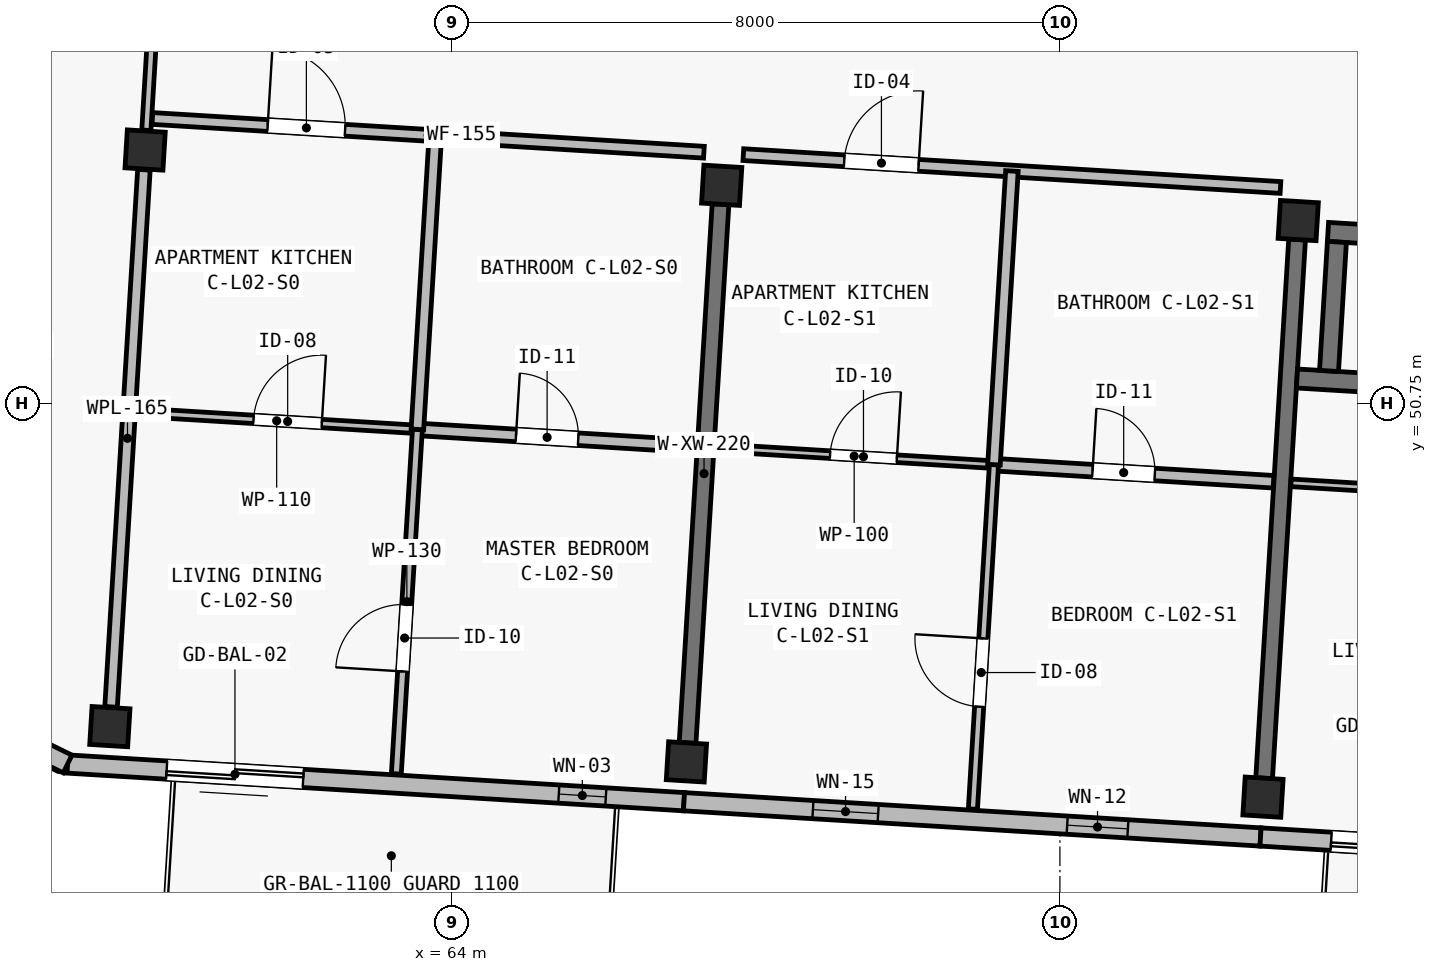
"""IFC4 building model, lengths in metres.
Left out: names, types, materials, properties, quantities, classifications, styles, units other than length and angle.
Written with IfcOpenShell. Run it as: python <this file> out.ifc"""

import sys

from ifc_helpers import new_model, si_unit, direction, frame, frame_2d, origin, origin_2d, place, context, subcontext, project, spatial, rectangle, extrude, element, fill, save


model = new_model("IFC4")
c1 = context("Model", 3, precision=1e-05, world=origin(), true_north=direction((0.0, 1.0)))
c2 = subcontext(c1, "Body", "Model", "MODEL_VIEW")
j1 = project(units=[si_unit("LENGTHUNIT", "METRE"), si_unit("PLANEANGLEUNIT", "RADIAN")], contexts=[c1])
p1 = place(None, origin())
s1 = spatial("IfcSite", under=j1, at=p1, CompositionType="ELEMENT")
p2 = place(p1, origin())
s2 = spatial("IfcBuilding", under=s1, at=p2, CompositionType="ELEMENT")
p3 = place(p2, frame((0.0, 0.0, 8.4)))
s3 = spatial("IfcBuildingStorey", under=s2, at=p3, CompositionType="ELEMENT", Elevation=8.4)
for number, where, z_axis, x_axis in (
    (1, (59.5, 46.5, 0.0), (0.0, 0.0, 1.0), (0.998, -0.061, 0.0)),
    (2, (59.964, 54.086, 0.0), (0.0, 0.0, 1.0), (0.998, -0.061, 0.0)),
    (3, (67.086, 46.036, 0.0), (0.0, 0.0, 1.0), (0.998, -0.061, 0.0)),
    (4, (67.55, 53.622, 0.0), (0.0, 0.0, 1.0), (0.998, -0.061, 0.0)),
    (5, (74.672, 45.572, 0.0), (0.0, 0.0, 1.0), (0.998, -0.061, 0.0)),
    (6, (75.135, 53.158, 0.0), (0.0, 0.0, 1.0), (0.998, -0.061, 0.0)),
):
    element("IfcColumn", number, at=place(p3, frame(where, z_axis=z_axis, x_axis=x_axis)), inside=s3, PredefinedType="COLUMN", context=c2, shape_type="SweptSolid", body=[
        extrude(rectangle(XDim=0.5, YDim=0.5, at=origin_2d()), origin(), (0.0, 0.0, 1.0), 3.25),
    ])
p4 = place(p3, frame((67.101, 46.286, 0.0), z_axis=(0.0, 0.0, 1.0), x_axis=(0.061035953884, 0.998135568114, 0.0)))
e7 = element("IfcWall", 7, at=p4, inside=s3, PredefinedType="SHEAR", context=c2, shape_type="SweptSolid", body=[
    extrude(rectangle(XDim=7.1, YDim=0.22, at=frame_2d((3.55, 0.0))), origin(), (0.0, 0.0, 1.0), 2.5),
])
p5 = place(p3, frame((74.687, 45.822, 0.0), z_axis=(0.0, 0.0, 1.0), x_axis=(0.061033859059, 0.99813569621, 0.0)))
e8 = element("IfcWall", 8, at=p5, inside=s3, PredefinedType="SHEAR", context=c2, shape_type="SweptSolid", body=[
    extrude(rectangle(XDim=7.1, YDim=0.22, at=frame_2d((3.55, 0.0))), origin(), (0.0, 0.0, 1.0), 2.5),
])
p6 = place(p3, frame((75.119, 51.08, 0.0), z_axis=(0.0, 0.0, 1.0), x_axis=(0.998133370443, -0.061071882298, 0.0)))
e9 = element("IfcWall", 9, at=p6, inside=s3, PredefinedType="SHEAR", context=c2, shape_type="SweptSolid", body=[
    extrude(rectangle(XDim=2.99, YDim=0.25, at=frame_2d((1.495, 0.0))), origin(), (0.0, 0.0, 1.0), 3.25),
])
p7 = place(p3, frame((75.527, 53.009, 0.0), z_axis=(0.0, 0.0, 1.0), x_axis=(0.998129907752, -0.061128448781, 0.0)))
e10 = element("IfcWall", 10, at=p7, inside=s3, PredefinedType="SHEAR", context=c2, shape_type="SweptSolid", body=[
    extrude(rectangle(XDim=2.7, YDim=0.25, at=frame_2d((1.35, 0.0))), origin(), (0.0, 0.0, 1.0), 3.25),
])
p8 = place(p7, frame((0.9, 0.0, 0.0)))
e11 = element("IfcOpeningElement", 11, at=p8, cuts=e10, PredefinedType="OPENING", context=c2, shape_type="SweptSolid", body=[
    extrude(rectangle(XDim=0.9, YDim=2.05, at=frame_2d((0.45, 1.025))), frame((0.0, 0.14, 0.0), z_axis=(0.0, -1.0, 0.0), x_axis=(1.0, 0.0, 0.0)), (0.0, 0.0, 1.0), 0.28),
])
p9 = place(p3, frame((75.541, 51.179, 0.0), z_axis=(0.0, 0.0, 1.0), x_axis=(0.061037062968, 0.998135500293, 0.0)))
e12 = element("IfcWall", 12, at=p9, inside=s3, PredefinedType="SHEAR", context=c2, shape_type="SweptSolid", body=[
    extrude(rectangle(XDim=1.7, YDim=0.25, at=frame_2d((0.85, 0.0))), origin(), (0.0, 0.0, 1.0), 3.25),
])
p10 = place(p3, frame((67.054, 45.512, 0.0), z_axis=(0.0, 0.0, 1.0), x_axis=(-0.998134248939, 0.061057522844, 0.0)))
e13 = element("IfcWall", 13, at=p10, inside=s3, PredefinedType="SOLIDWALL", context=c2, shape_type="SweptSolid", body=[
    extrude(rectangle(XDim=8.125, YDim=0.24, at=frame_2d((4.062, 0.0))), origin(), (0.0, 0.0, 1.0), 3.0),
])
p11 = place(p10, frame((5.019, 0.0, 0.0)))
e14 = element("IfcOpeningElement", 14, at=p11, cuts=e13, PredefinedType="OPENING", context=c2, shape_type="SweptSolid", body=[
    extrude(rectangle(XDim=1.8, YDim=2.12, at=frame_2d((0.9, 1.06))), frame((0.0, 0.135, 0.0), z_axis=(0.0, -1.0, 0.0), x_axis=(1.0, 0.0, 0.0)), (0.0, 0.0, 1.0), 0.27),
])
p12 = place(p10, frame((1.03, 0.0, 0.5)))
e15 = element("IfcOpeningElement", 15, at=p12, cuts=e13, PredefinedType="OPENING", context=c2, shape_type="SweptSolid", body=[
    extrude(rectangle(XDim=0.62, YDim=2.28, at=frame_2d((0.31, 1.14))), frame((0.0, 0.135, 0.0), z_axis=(0.0, -1.0, 0.0), x_axis=(1.0, 0.0, 0.0)), (0.0, 0.0, 1.0), 0.27),
])
p13 = place(p3, frame((74.64, 45.048, 0.0), z_axis=(0.0, 0.0, 1.0), x_axis=(-0.998135669243, 0.061034300063, 0.0)))
e16 = element("IfcWall", 16, at=p13, inside=s3, PredefinedType="SOLIDWALL", context=c2, shape_type="SweptSolid", body=[
    extrude(rectangle(XDim=7.6, YDim=0.24, at=frame_2d((3.8, 0.0))), origin(), (0.0, 0.0, 1.0), 3.0),
])
p14 = place(p13, frame((1.749, 0.0, 0.42)))
e17 = element("IfcOpeningElement", 17, at=p14, cuts=e16, PredefinedType="OPENING", context=c2, shape_type="SweptSolid", body=[
    extrude(rectangle(XDim=0.8, YDim=2.3, at=frame_2d((0.4, 1.15))), frame((0.0, 0.135, 0.0), z_axis=(0.0, -1.0, 0.0), x_axis=(1.0, 0.0, 0.0)), (0.0, 0.0, 1.0), 0.27),
])
p15 = place(p13, frame((5.04, 0.0, 0.42)))
e18 = element("IfcOpeningElement", 18, at=p15, cuts=e16, PredefinedType="OPENING", context=c2, shape_type="SweptSolid", body=[
    extrude(rectangle(XDim=0.86, YDim=2.36, at=frame_2d((0.43, 1.18))), frame((0.0, 0.135, 0.0), z_axis=(0.0, -1.0, 0.0), x_axis=(1.0, 0.0, 0.0)), (0.0, 0.0, 1.0), 0.27),
])
p16 = place(p3, frame((82.225, 44.584, 0.0), z_axis=(0.0, 0.0, 1.0), x_axis=(-0.998133591969, 0.061068261669, 0.0)))
e19 = element("IfcWall", 19, at=p16, inside=s3, PredefinedType="SOLIDWALL", context=c2, shape_type="SweptSolid", body=[
    extrude(rectangle(XDim=7.6, YDim=0.24, at=frame_2d((3.8, 0.0))), origin(), (0.0, 0.0, 1.0), 3.0),
])
p17 = place(p16, frame((5.169, 0.0, 0.0)))
e20 = element("IfcOpeningElement", 20, at=p17, cuts=e19, PredefinedType="OPENING", context=c2, shape_type="SweptSolid", body=[
    extrude(rectangle(XDim=1.5, YDim=2.12, at=frame_2d((0.75, 1.06))), frame((0.0, 0.135, 0.0), z_axis=(0.0, -1.0, 0.0), x_axis=(1.0, 0.0, 0.0)), (0.0, 0.0, 1.0), 0.27),
])
p18 = place(p16, frame((0.73, 0.0, 0.46)))
e21 = element("IfcOpeningElement", 21, at=p18, cuts=e19, PredefinedType="OPENING", context=c2, shape_type="SweptSolid", body=[
    extrude(rectangle(XDim=0.74, YDim=2.26, at=frame_2d((0.37, 1.13))), frame((0.0, 0.135, 0.0), z_axis=(0.0, -1.0, 0.0), x_axis=(1.0, 0.0, 0.0)), (0.0, 0.0, 1.0), 0.27),
])
p19 = place(p3, frame((58.944, 46.008, 0.0), z_axis=(0.0, 0.0, 1.0), x_axis=(-0.897775054318, 0.440454256246, 0.0)))
e22 = element("IfcWall", 22, at=p19, inside=s3, PredefinedType="SOLIDWALL", context=c2, shape_type="SweptSolid", body=[
    extrude(rectangle(XDim=8.12, YDim=0.26, at=frame_2d((4.06, 0.0))), origin(), (0.0, 0.0, 1.0), 3.0),
])
p20 = place(p19, frame((2.81, 0.0, 0.45)))
e23 = element("IfcOpeningElement", 23, at=p20, cuts=e22, PredefinedType="OPENING", context=c2, shape_type="SweptSolid", body=[
    extrude(rectangle(XDim=0.64, YDim=2.18, at=frame_2d((0.32, 1.09))), frame((0.0, 0.145, 0.0), z_axis=(0.0, -1.0, 0.0), x_axis=(1.0, 0.0, 0.0)), (0.0, 0.0, 1.0), 0.29),
])
p21 = place(p19, frame((4.531, 0.0, 0.52)))
e24 = element("IfcOpeningElement", 24, at=p21, cuts=e22, PredefinedType="OPENING", context=c2, shape_type="SweptSolid", body=[
    extrude(rectangle(XDim=0.78, YDim=2.2, at=frame_2d((0.39, 1.1))), frame((0.0, 0.145, 0.0), z_axis=(0.0, -1.0, 0.0), x_axis=(1.0, 0.0, 0.0)), (0.0, 0.0, 1.0), 0.29),
])
p22 = place(p3, frame((51.654, 49.585, 0.0), z_axis=(0.0, 0.0, 1.0), x_axis=(0.448621989068, 0.893721607059, 0.0)))
e25 = element("IfcWall", 25, at=p22, inside=s3, PredefinedType="SOLIDWALL", context=c2, shape_type="SweptSolid", body=[
    extrude(rectangle(XDim=19.061, YDim=0.26, at=frame_2d((9.53, 0.0))), origin(), (0.0, 0.0, 1.0), 3.0),
])
p23 = place(p22, frame((2.81, 0.0, 0.45)))
e26 = element("IfcOpeningElement", 26, at=p23, cuts=e25, PredefinedType="OPENING", context=c2, shape_type="SweptSolid", body=[
    extrude(rectangle(XDim=0.64, YDim=2.18, at=frame_2d((0.32, 1.09))), frame((0.0, 0.145, 0.0), z_axis=(0.0, -1.0, 0.0), x_axis=(1.0, 0.0, 0.0)), (0.0, 0.0, 1.0), 0.29),
])
p24 = place(p22, frame((15.47, 0.0, 0.52)))
e27 = element("IfcOpeningElement", 27, at=p24, cuts=e25, PredefinedType="OPENING", context=c2, shape_type="SweptSolid", body=[
    extrude(rectangle(XDim=0.78, YDim=2.2, at=frame_2d((0.39, 1.1))), frame((0.0, 0.145, 0.0), z_axis=(0.0, -1.0, 0.0), x_axis=(1.0, 0.0, 0.0)), (0.0, 0.0, 1.0), 0.29),
])
p25 = place(p3, frame((59.98, 54.345, 0.0), z_axis=(0.0, 0.0, 1.0), x_axis=(0.061101107425, 0.998131581843, 0.0)))
e28 = element("IfcWall", 28, at=p25, inside=s3, PredefinedType="PARTITIONING", context=c2, shape_type="SweptSolid", body=[
    extrude(rectangle(XDim=3.88, YDim=0.12, at=frame_2d((1.94, 0.0))), origin(), (0.0, 0.0, 1.0), 2.5),
])
p26 = place(p25, frame((1.35, 0.0, 0.0)))
e29 = element("IfcOpeningElement", 29, at=p26, cuts=e28, PredefinedType="OPENING", context=c2, shape_type="SweptSolid", body=[
    extrude(rectangle(XDim=0.88, YDim=2.1, at=frame_2d((0.44, 1.05))), frame((0.0, 0.075, 0.0), z_axis=(0.0, -1.0, 0.0), x_axis=(1.0, 0.0, 0.0)), (0.0, 0.0, 1.0), 0.15),
])
p27 = place(p3, frame((59.516, 46.76, 0.0), z_axis=(0.0, 0.0, 1.0), x_axis=(0.061034344288, 0.998135666539, 0.0)))
e30 = element("IfcWall", 30, at=p27, inside=s3, PredefinedType="PLUMBINGWALL", context=c2, shape_type="SweptSolid", body=[
    extrude(rectangle(XDim=7.08, YDim=0.165, at=frame_2d((3.54, 0.0))), origin(), (0.0, 0.0, 1.0), 2.5),
])
p28 = place(p3, frame((60.06, 54.501, 0.0), z_axis=(0.0, 0.0, 1.0), x_axis=(0.998134543433, -0.06105270843, 0.0)))
e31 = element("IfcWall", 31, at=p28, inside=s3, PredefinedType="PARTITIONING", context=c2, shape_type="SweptSolid", body=[
    extrude(rectangle(XDim=7.27, YDim=0.155, at=frame_2d((3.635, 0.0))), origin(), (0.0, 0.0, 1.0), 2.97),
])
p29 = place(p28, frame((1.52, 0.0, 0.0)))
e32 = element("IfcOpeningElement", 32, at=p29, cuts=e31, PredefinedType="OPENING", context=c2, shape_type="SweptSolid", body=[
    extrude(rectangle(XDim=1.02, YDim=2.2, at=frame_2d((0.51, 1.1))), frame((0.0, 0.093, 0.0), z_axis=(0.0, -1.0, 0.0), x_axis=(1.0, 0.0, 0.0)), (0.0, 0.0, 1.0), 0.185),
])
p30 = place(p3, frame((59.843, 50.637, 0.0), z_axis=(0.0, 0.0, 1.0), x_axis=(0.998133408508, -0.061071260176, 0.0)))
e33 = element("IfcWall", 33, at=p30, inside=s3, PredefinedType="PARTITIONING", context=c2, shape_type="SweptSolid", body=[
    extrude(rectangle(XDim=3.71, YDim=0.11, at=frame_2d((1.855, 0.0))), origin(), (0.0, 0.0, 1.0), 2.97),
])
p31 = place(p30, frame((1.55, 0.0, 0.0)))
e34 = element("IfcOpeningElement", 34, at=p31, cuts=e33, PredefinedType="OPENING", context=c2, shape_type="SweptSolid", body=[
    extrude(rectangle(XDim=0.9, YDim=2.1, at=frame_2d((0.45, 1.05))), frame((0.0, 0.07, 0.0), z_axis=(0.0, -1.0, 0.0), x_axis=(1.0, 0.0, 0.0)), (0.0, 0.0, 1.0), 0.14),
])
p32 = place(p3, frame((63.546, 50.41, 0.0), z_axis=(0.0, 0.0, 1.0), x_axis=(0.998136719672, -0.061017119263, 0.0)))
e35 = element("IfcWall", 35, at=p32, inside=s3, PredefinedType="PLUMBINGWALL", context=c2, shape_type="SweptSolid", body=[
    extrude(rectangle(XDim=3.685, YDim=0.165, at=frame_2d((1.843, 0.0))), origin(), (0.0, 0.0, 1.0), 2.97),
])
p33 = place(p32, frame((1.3, 0.0, 0.0)))
e36 = element("IfcOpeningElement", 36, at=p33, cuts=e35, PredefinedType="OPENING", context=c2, shape_type="SweptSolid", body=[
    extrude(rectangle(XDim=0.82, YDim=2.08, at=frame_2d((0.41, 1.04))), frame((0.0, 0.097, 0.0), z_axis=(0.0, -1.0, 0.0), x_axis=(1.0, 0.0, 0.0)), (0.0, 0.0, 1.0), 0.195),
])
p34 = place(p3, frame((63.269, 45.879, 0.0), z_axis=(0.0, 0.0, 1.0), x_axis=(0.061035713941, 0.998135582786, 0.0)))
e37 = element("IfcWall", 37, at=p34, inside=s3, PredefinedType="PARTITIONING", context=c2, shape_type="SweptSolid", body=[
    extrude(rectangle(XDim=4.54, YDim=0.13, at=frame_2d((2.27, 0.0))), origin(), (0.0, 0.0, 1.0), 2.97),
])
p35 = place(p34, frame((1.35, 0.0, 0.0)))
e38 = element("IfcOpeningElement", 38, at=p35, cuts=e37, PredefinedType="OPENING", context=c2, shape_type="SweptSolid", body=[
    extrude(rectangle(XDim=0.88, YDim=2.1, at=frame_2d((0.44, 1.05))), frame((0.0, 0.08, 0.0), z_axis=(0.0, -1.0, 0.0), x_axis=(1.0, 0.0, 0.0)), (0.0, 0.0, 1.0), 0.16),
])
p36 = place(p3, frame((63.546, 50.41, 0.0), z_axis=(0.0, 0.0, 1.0), x_axis=(0.061066453301, 0.998133702608, 0.0)))
e39 = element("IfcWall", 39, at=p36, inside=s3, PredefinedType="PLUMBINGWALL", context=c2, shape_type="SweptSolid", body=[
    extrude(rectangle(XDim=3.87, YDim=0.165, at=frame_2d((1.935, 0.0))), origin(), (0.0, 0.0, 1.0), 2.97),
])
p37 = place(p3, frame((67.835, 54.025, 0.0), z_axis=(0.0, 0.0, 1.0), x_axis=(0.998135666539, -0.061034344288, 0.0)))
e40 = element("IfcWall", 40, at=p37, inside=s3, PredefinedType="PARTITIONING", context=c2, shape_type="SweptSolid", body=[
    extrude(rectangle(XDim=7.08, YDim=0.155, at=frame_2d((3.54, 0.0))), origin(), (0.0, 0.0, 1.0), 2.97),
])
p38 = place(p37, frame((1.33, 0.0, 0.0)))
e41 = element("IfcOpeningElement", 41, at=p38, cuts=e40, PredefinedType="OPENING", context=c2, shape_type="SweptSolid", body=[
    extrude(rectangle(XDim=0.98, YDim=2.15, at=frame_2d((0.49, 1.075))), frame((0.0, 0.093, 0.0), z_axis=(0.0, -1.0, 0.0), x_axis=(1.0, 0.0, 0.0)), (0.0, 0.0, 1.0), 0.185),
])
p39 = place(p3, frame((67.454, 50.171, 0.0), z_axis=(0.0, 0.0, 1.0), x_axis=(0.998132682596, -0.061083123148, 0.0)))
e42 = element("IfcWall", 42, at=p39, inside=s3, PredefinedType="PARTITIONING", context=c2, shape_type="SweptSolid", body=[
    extrude(rectangle(XDim=3.685, YDim=0.1, at=frame_2d((1.843, 0.0))), origin(), (0.0, 0.0, 1.0), 2.97),
])
p40 = place(p39, frame((1.525, 0.0, 0.0)))
e43 = element("IfcOpeningElement", 43, at=p40, cuts=e42, PredefinedType="OPENING", context=c2, shape_type="SweptSolid", body=[
    extrude(rectangle(XDim=0.88, YDim=2.1, at=frame_2d((0.44, 1.05))), frame((0.0, 0.065, 0.0), z_axis=(0.0, -1.0, 0.0), x_axis=(1.0, 0.0, 0.0)), (0.0, 0.0, 1.0), 0.13),
])
p41 = place(p3, frame((71.132, 49.946, 0.0), z_axis=(0.0, 0.0, 1.0), x_axis=(0.998136719672, -0.061017119263, 0.0)))
e44 = element("IfcWall", 44, at=p41, inside=s3, PredefinedType="PLUMBINGWALL", context=c2, shape_type="SweptSolid", body=[
    extrude(rectangle(XDim=3.685, YDim=0.165, at=frame_2d((1.843, 0.0))), origin(), (0.0, 0.0, 1.0), 2.97),
])
p42 = place(p41, frame((1.3, 0.0, 0.0)))
e45 = element("IfcOpeningElement", 45, at=p42, cuts=e44, PredefinedType="OPENING", context=c2, shape_type="SweptSolid", body=[
    extrude(rectangle(XDim=0.82, YDim=2.08, at=frame_2d((0.41, 1.04))), frame((0.0, 0.097, 0.0), z_axis=(0.0, -1.0, 0.0), x_axis=(1.0, 0.0, 0.0)), (0.0, 0.0, 1.0), 0.195),
])
p43 = place(p3, frame((70.855, 45.415, 0.0), z_axis=(0.0, 0.0, 1.0), x_axis=(0.061035713941, 0.998135582786, 0.0)))
e46 = element("IfcWall", 46, at=p43, inside=s3, PredefinedType="PARTITIONING", context=c2, shape_type="SweptSolid", body=[
    extrude(rectangle(XDim=4.54, YDim=0.12, at=frame_2d((2.27, 0.0))), origin(), (0.0, 0.0, 1.0), 2.97),
])
p44 = place(p43, frame((1.35, 0.0, 0.0)))
e47 = element("IfcOpeningElement", 47, at=p44, cuts=e46, PredefinedType="OPENING", context=c2, shape_type="SweptSolid", body=[
    extrude(rectangle(XDim=0.9, YDim=2.1, at=frame_2d((0.45, 1.05))), frame((0.0, 0.075, 0.0), z_axis=(0.0, -1.0, 0.0), x_axis=(1.0, 0.0, 0.0)), (0.0, 0.0, 1.0), 0.15),
])
p45 = place(p3, frame((71.132, 49.946, 0.0), z_axis=(0.0, 0.0, 1.0), x_axis=(0.061066453301, 0.998133702608, 0.0)))
e48 = element("IfcWall", 48, at=p45, inside=s3, PredefinedType="PLUMBINGWALL", context=c2, shape_type="SweptSolid", body=[
    extrude(rectangle(XDim=3.87, YDim=0.165, at=frame_2d((1.935, 0.0))), origin(), (0.0, 0.0, 1.0), 2.97),
])
p46 = place(p3, frame((75.04, 49.707, 0.0), z_axis=(0.0, 0.0, 1.0), x_axis=(0.998135637207, -0.061034823981, 0.0)))
e49 = element("IfcWall", 49, at=p46, inside=s3, PredefinedType="PARTITIONING", context=c2, shape_type="SweptSolid", body=[
    extrude(rectangle(XDim=5.08, YDim=0.1, at=frame_2d((2.54, 0.0))), origin(), (0.0, 0.0, 1.0), 2.97),
])
p47 = place(p46, frame((3.595, 0.0, 0.0)))
e50 = element("IfcOpeningElement", 50, at=p47, cuts=e49, PredefinedType="OPENING", context=c2, shape_type="SweptSolid", body=[
    extrude(rectangle(XDim=0.88, YDim=2.1, at=frame_2d((0.44, 1.05))), frame((0.0, 0.065, 0.0), z_axis=(0.0, -1.0, 0.0), x_axis=(1.0, 0.0, 0.0)), (0.0, 0.0, 1.0), 0.13),
])
p48 = place(p11, origin())
e51 = element("IfcDoor", 51, at=p48, inside=s3, OperationType="SLIDING_TO_LEFT", PredefinedType="DOOR", context=c2, shape_type="SweptSolid", body=[
    extrude(rectangle(XDim=1.8, YDim=2.12, at=frame_2d((0.9, 1.06))), frame((0.0, 0.025, 0.0), z_axis=(0.0, -1.0, 0.0), x_axis=(1.0, 0.0, 0.0)), (0.0, 0.0, 1.0), 0.05),
])
fill(e14, e51)
p49 = place(p12, origin())
e52 = element("IfcWindow", 52, at=p49, inside=s3, PartitioningType="SINGLE_PANEL", PredefinedType="WINDOW", context=c2, shape_type="SweptSolid", body=[
    extrude(rectangle(XDim=0.62, YDim=2.28, at=frame_2d((0.31, 1.14))), frame((0.0, 0.03, 0.0), z_axis=(0.0, -1.0, 0.0), x_axis=(1.0, 0.0, 0.0)), (0.0, 0.0, 1.0), 0.06),
])
fill(e15, e52)
p50 = place(p14, origin())
e53 = element("IfcWindow", 53, at=p50, inside=s3, PartitioningType="SINGLE_PANEL", PredefinedType="WINDOW", context=c2, shape_type="SweptSolid", body=[
    extrude(rectangle(XDim=0.8, YDim=2.3, at=frame_2d((0.4, 1.15))), frame((0.0, 0.03, 0.0), z_axis=(0.0, -1.0, 0.0), x_axis=(1.0, 0.0, 0.0)), (0.0, 0.0, 1.0), 0.06),
])
fill(e17, e53)
p51 = place(p15, origin())
e54 = element("IfcWindow", 54, at=p51, inside=s3, PartitioningType="SINGLE_PANEL", PredefinedType="WINDOW", context=c2, shape_type="SweptSolid", body=[
    extrude(rectangle(XDim=0.86, YDim=2.36, at=frame_2d((0.43, 1.18))), frame((0.0, 0.03, 0.0), z_axis=(0.0, -1.0, 0.0), x_axis=(1.0, 0.0, 0.0)), (0.0, 0.0, 1.0), 0.06),
])
fill(e18, e54)
p52 = place(p17, origin())
e55 = element("IfcDoor", 55, at=p52, inside=s3, OperationType="SLIDING_TO_RIGHT", PredefinedType="DOOR", context=c2, shape_type="SweptSolid", body=[
    extrude(rectangle(XDim=1.5, YDim=2.12, at=frame_2d((0.75, 1.06))), frame((0.0, 0.025, 0.0), z_axis=(0.0, -1.0, 0.0), x_axis=(1.0, 0.0, 0.0)), (0.0, 0.0, 1.0), 0.05),
])
fill(e20, e55)
p53 = place(p29, origin())
e56 = element("IfcDoor", 56, at=p53, inside=s3, OperationType="SINGLE_SWING_LEFT", PredefinedType="DOOR", context=c2, shape_type="SweptSolid", body=[
    extrude(rectangle(XDim=1.02, YDim=2.2, at=frame_2d((0.51, 1.1))), frame((0.0, 0.025, 0.0), z_axis=(0.0, -1.0, 0.0), x_axis=(1.0, 0.0, 0.0)), (0.0, 0.0, 1.0), 0.05),
])
fill(e32, e56)
p54 = place(p31, origin())
e57 = element("IfcDoor", 57, at=p54, inside=s3, OperationType="SINGLE_SWING_RIGHT", PredefinedType="DOOR", context=c2, shape_type="SweptSolid", body=[
    extrude(rectangle(XDim=0.9, YDim=2.1, at=frame_2d((0.45, 1.05))), frame((0.0, 0.025, 0.0), z_axis=(0.0, -1.0, 0.0), x_axis=(1.0, 0.0, 0.0)), (0.0, 0.0, 1.0), 0.05),
])
fill(e34, e57)
p55 = place(p33, origin())
e58 = element("IfcDoor", 58, at=p55, inside=s3, OperationType="SINGLE_SWING_LEFT", PredefinedType="DOOR", context=c2, shape_type="SweptSolid", body=[
    extrude(rectangle(XDim=0.82, YDim=2.08, at=frame_2d((0.41, 1.04))), frame((0.0, 0.025, 0.0), z_axis=(0.0, -1.0, 0.0), x_axis=(1.0, 0.0, 0.0)), (0.0, 0.0, 1.0), 0.05),
])
fill(e36, e58)
p56 = place(p35, origin())
e59 = element("IfcDoor", 59, at=p56, inside=s3, OperationType="SINGLE_SWING_LEFT", PredefinedType="DOOR", context=c2, shape_type="SweptSolid", body=[
    extrude(rectangle(XDim=0.88, YDim=2.1, at=frame_2d((0.44, 1.05))), frame((0.0, 0.025, 0.0), z_axis=(0.0, -1.0, 0.0), x_axis=(1.0, 0.0, 0.0)), (0.0, 0.0, 1.0), 0.05),
])
fill(e38, e59)
p57 = place(p38, origin())
e60 = element("IfcDoor", 60, at=p57, inside=s3, OperationType="SINGLE_SWING_RIGHT", PredefinedType="DOOR", context=c2, shape_type="SweptSolid", body=[
    extrude(rectangle(XDim=0.98, YDim=2.15, at=frame_2d((0.49, 1.075))), frame((0.0, 0.025, 0.0), z_axis=(0.0, -1.0, 0.0), x_axis=(1.0, 0.0, 0.0)), (0.0, 0.0, 1.0), 0.05),
])
fill(e41, e60)
p58 = place(p40, origin())
e61 = element("IfcDoor", 61, at=p58, inside=s3, OperationType="SINGLE_SWING_RIGHT", PredefinedType="DOOR", context=c2, shape_type="SweptSolid", body=[
    extrude(rectangle(XDim=0.88, YDim=2.1, at=frame_2d((0.44, 1.05))), frame((0.0, 0.025, 0.0), z_axis=(0.0, -1.0, 0.0), x_axis=(1.0, 0.0, 0.0)), (0.0, 0.0, 1.0), 0.05),
])
fill(e43, e61)
p59 = place(p42, origin())
e62 = element("IfcDoor", 62, at=p59, inside=s3, OperationType="SINGLE_SWING_LEFT", PredefinedType="DOOR", context=c2, shape_type="SweptSolid", body=[
    extrude(rectangle(XDim=0.82, YDim=2.08, at=frame_2d((0.41, 1.04))), frame((0.0, 0.025, 0.0), z_axis=(0.0, -1.0, 0.0), x_axis=(1.0, 0.0, 0.0)), (0.0, 0.0, 1.0), 0.05),
])
fill(e45, e62)
p60 = place(p44, origin())
e63 = element("IfcDoor", 63, at=p60, inside=s3, OperationType="SINGLE_SWING_RIGHT", PredefinedType="DOOR", context=c2, shape_type="SweptSolid", body=[
    extrude(rectangle(XDim=0.9, YDim=2.1, at=frame_2d((0.45, 1.05))), frame((0.0, 0.025, 0.0), z_axis=(0.0, -1.0, 0.0), x_axis=(1.0, 0.0, 0.0)), (0.0, 0.0, 1.0), 0.05),
])
fill(e47, e63)
save(model, sys.argv[1])
